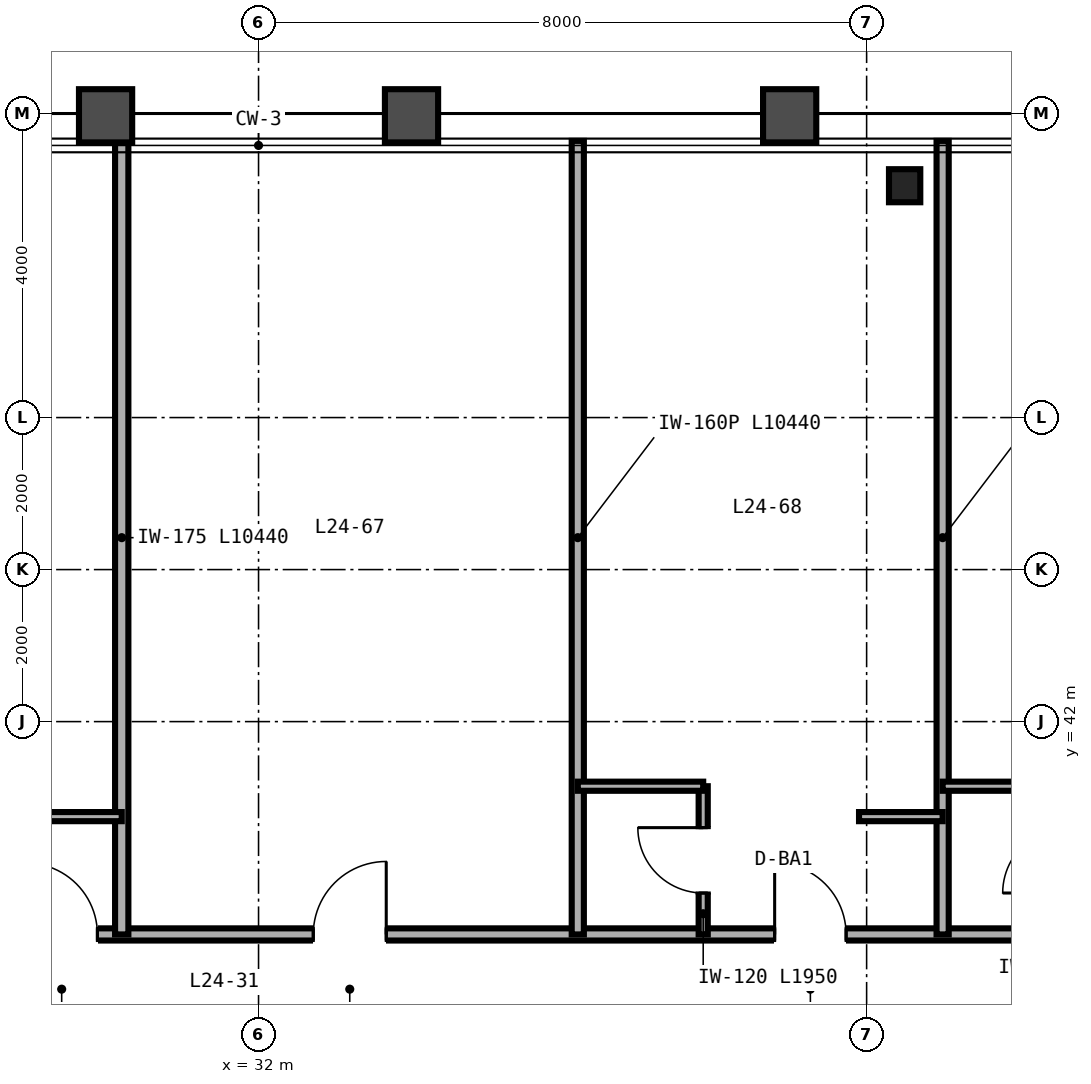
"""IFC4 building model, lengths in metres.
Left out: names, types, materials, properties, quantities, classifications, styles, units other than length and angle.
Written with IfcOpenShell. Run it as: python <this file> out.ifc"""

import sys

from ifc_helpers import new_model, si_unit, direction, frame, frame_2d, origin, origin_2d, place, context, subcontext, project, spatial, rectangle, i_section, extrude, source, transform, mapped, element, fill, save


model = new_model("IFC4")
c1 = context("Model", 3, precision=1e-05, world=origin(), true_north=direction((0.0, 1.0)))
c2 = subcontext(c1, "Body", "Model", "MODEL_VIEW")
j1 = project(units=[si_unit("LENGTHUNIT", "METRE"), si_unit("PLANEANGLEUNIT", "RADIAN")], contexts=[c1])
p1 = place(None, origin())
s1 = spatial("IfcSite", under=j1, at=p1, CompositionType="ELEMENT")
p2 = place(p1, origin())
s2 = spatial("IfcBuilding", under=s1, at=p2, CompositionType="ELEMENT")
p3 = place(p2, frame((0.0, 0.0, 100.8)))
s3 = spatial("IfcBuildingStorey", under=s2, at=p3, CompositionType="ELEMENT", Elevation=100.8)
m1 = source(origin(), c2, "Body", "SweptSolid", [
    extrude(i_section(OverallWidth=0.412, OverallDepth=0.435, WebThickness=0.036, FlangeThickness=0.057, FilletRadius=0.025, at=origin_2d()), origin(), (0.0, 0.0, 1.0), 3.36),
])
p4 = place(p3, frame((40.5, 49.05, 0.0), z_axis=(0.0, 0.0, 1.0), x_axis=(1.0, 0.0, 0.0)))
e1 = element("IfcColumn", 1, at=p4, inside=s3, PredefinedType="COLUMN", context=c2, shape_type="MappedRepresentation", body=[
    mapped(m1, transform((0.0, 0.0, 0.0), scale=1.0)),
])
p5 = place(p3, frame((14.0, 39.2, 0.0), z_axis=(0.0, 0.0, 1.0), x_axis=(1.0, 0.0, 0.0)))
e2 = element("IfcWall", 2, at=p5, inside=s3, PredefinedType="PARTITIONING", context=c2, shape_type="SweptSolid", body=[
    extrude(rectangle(XDim=36.0, YDim=0.16, at=frame_2d((18.0, 0.0))), origin(), (0.0, 0.0, 1.0), 2.581),
])
p6 = place(p5, frame((3.94, 0.0, 0.0)))
e3 = element("IfcOpeningElement", 3, at=p6, cuts=e2, PredefinedType="OPENING", context=c2, shape_type="SweptSolid", body=[
    extrude(rectangle(XDim=0.94, YDim=2.15, at=frame_2d((0.47, 1.075))), frame((0.0, 0.09, 0.0), z_axis=(0.0, -1.0, 0.0), x_axis=(1.0, 0.0, 0.0)), (0.0, 0.0, 1.0), 0.18),
])
p7 = place(p5, frame((7.89, 0.0, 0.0)))
e4 = element("IfcOpeningElement", 4, at=p7, cuts=e2, PredefinedType="OPENING", context=c2, shape_type="SweptSolid", body=[
    extrude(rectangle(XDim=0.94, YDim=2.15, at=frame_2d((0.47, 1.075))), frame((0.0, 0.09, 0.0), z_axis=(0.0, -1.0, 0.0), x_axis=(1.0, 0.0, 0.0)), (0.0, 0.0, 1.0), 0.18),
])
p8 = place(p5, frame((14.94, 0.0, 0.0)))
e5 = element("IfcOpeningElement", 5, at=p8, cuts=e2, PredefinedType="OPENING", context=c2, shape_type="SweptSolid", body=[
    extrude(rectangle(XDim=0.94, YDim=2.15, at=frame_2d((0.47, 1.075))), frame((0.0, 0.09, 0.0), z_axis=(0.0, -1.0, 0.0), x_axis=(1.0, 0.0, 0.0)), (0.0, 0.0, 1.0), 0.18),
])
p9 = place(p5, frame((18.72, 0.0, 0.0)))
e6 = element("IfcOpeningElement", 6, at=p9, cuts=e2, PredefinedType="OPENING", context=c2, shape_type="SweptSolid", body=[
    extrude(rectangle(XDim=0.96, YDim=2.15, at=frame_2d((0.48, 1.075))), frame((0.0, 0.09, 0.0), z_axis=(0.0, -1.0, 0.0), x_axis=(1.0, 0.0, 0.0)), (0.0, 0.0, 1.0), 0.18),
])
p10 = place(p5, frame((24.79, 0.0, 0.0)))
e7 = element("IfcOpeningElement", 7, at=p10, cuts=e2, PredefinedType="OPENING", context=c2, shape_type="SweptSolid", body=[
    extrude(rectangle(XDim=0.94, YDim=2.15, at=frame_2d((0.47, 1.075))), frame((0.0, 0.09, 0.0), z_axis=(0.0, -1.0, 0.0), x_axis=(1.0, 0.0, 0.0)), (0.0, 0.0, 1.0), 0.18),
])
p11 = place(p5, frame((30.34, 0.0, 0.0)))
e8 = element("IfcOpeningElement", 8, at=p11, cuts=e2, PredefinedType="OPENING", context=c2, shape_type="SweptSolid", body=[
    extrude(rectangle(XDim=0.94, YDim=2.15, at=frame_2d((0.47, 1.075))), frame((0.0, 0.09, 0.0), z_axis=(0.0, -1.0, 0.0), x_axis=(1.0, 0.0, 0.0)), (0.0, 0.0, 1.0), 0.18),
])
p12 = place(p5, frame((34.74, 0.0, 0.0)))
e9 = element("IfcOpeningElement", 9, at=p12, cuts=e2, PredefinedType="OPENING", context=c2, shape_type="SweptSolid", body=[
    extrude(rectangle(XDim=0.94, YDim=2.15, at=frame_2d((0.47, 1.075))), frame((0.0, 0.09, 0.0), z_axis=(0.0, -1.0, 0.0), x_axis=(1.0, 0.0, 0.0)), (0.0, 0.0, 1.0), 0.18),
])
p13 = place(p3, frame((30.2, 39.2, 0.0), z_axis=(0.0, 0.0, 1.0), x_axis=(0.0, 1.0, 0.0)))
e10 = element("IfcWall", 10, at=p13, inside=s3, PredefinedType="PARTITIONING", context=c2, shape_type="SweptSolid", body=[
    extrude(rectangle(XDim=10.44, YDim=0.175, at=frame_2d((5.22, 0.0))), origin(), (0.0, 0.0, 1.0), 2.433),
])
p14 = place(p3, frame((29.1, 40.75, 0.0), z_axis=(0.0, 0.0, 1.0), x_axis=(1.0, 0.0, 0.0)))
e11 = element("IfcWall", 11, at=p14, inside=s3, PredefinedType="PARTITIONING", context=c2, shape_type="SweptSolid", body=[
    extrude(rectangle(XDim=1.1, YDim=0.12, at=frame_2d((0.55, 0.0))), origin(), (0.0, 0.0, 1.0), 3.36),
])
p15 = place(p3, frame((36.2, 39.2, 0.0), z_axis=(0.0, 0.0, 1.0), x_axis=(0.0, 1.0, 0.0)))
e12 = element("IfcWall", 12, at=p15, inside=s3, PredefinedType="PARTITIONING", context=c2, shape_type="SweptSolid", body=[
    extrude(rectangle(XDim=10.44, YDim=0.16, at=frame_2d((5.22, 0.0))), origin(), (0.0, 0.0, 1.0), 2.433),
])
p16 = place(p3, frame((41.0, 39.2, 0.0), z_axis=(0.0, 0.0, 1.0), x_axis=(0.0, 1.0, 0.0)))
e13 = element("IfcWall", 13, at=p16, inside=s3, PredefinedType="PARTITIONING", context=c2, shape_type="SweptSolid", body=[
    extrude(rectangle(XDim=10.44, YDim=0.16, at=frame_2d((5.22, 0.0))), origin(), (0.0, 0.0, 1.0), 2.823),
])
p17 = place(p3, frame((37.85, 39.2, 0.0), z_axis=(0.0, 0.0, 1.0), x_axis=(0.0, 1.0, 0.0)))
e14 = element("IfcWall", 14, at=p17, inside=s3, PredefinedType="PARTITIONING", context=c2, shape_type="SweptSolid", body=[
    extrude(rectangle(XDim=1.95, YDim=0.12, at=frame_2d((0.975, 0.0))), origin(), (0.0, 0.0, 1.0), 3.36),
])
p18 = place(p17, frame((0.545, 0.0, 0.0)))
e15 = element("IfcOpeningElement", 15, at=p18, cuts=e14, PredefinedType="OPENING", context=c2, shape_type="SweptSolid", body=[
    extrude(rectangle(XDim=0.86, YDim=2.1, at=frame_2d((0.43, 1.05))), frame((0.0, 0.07, 0.0), z_axis=(0.0, -1.0, 0.0), x_axis=(1.0, 0.0, 0.0)), (0.0, 0.0, 1.0), 0.14),
])
p19 = place(p3, frame((36.2, 41.15, 0.0), z_axis=(0.0, 0.0, 1.0), x_axis=(1.0, 0.0, 0.0)))
e16 = element("IfcWall", 16, at=p19, inside=s3, PredefinedType="PARTITIONING", context=c2, shape_type="SweptSolid", body=[
    extrude(rectangle(XDim=1.65, YDim=0.12, at=frame_2d((0.825, 0.0))), origin(), (0.0, 0.0, 1.0), 3.36),
])
p20 = place(p3, frame((39.9, 40.75, 0.0), z_axis=(0.0, 0.0, 1.0), x_axis=(1.0, 0.0, 0.0)))
e17 = element("IfcWall", 17, at=p20, inside=s3, PredefinedType="PARTITIONING", context=c2, shape_type="SweptSolid", body=[
    extrude(rectangle(XDim=1.1, YDim=0.12, at=frame_2d((0.55, 0.0))), origin(), (0.0, 0.0, 1.0), 2.581),
])
p21 = place(p3, frame((41.0, 41.15, 0.0), z_axis=(0.0, 0.0, 1.0), x_axis=(1.0, 0.0, 0.0)))
e18 = element("IfcWall", 18, at=p21, inside=s3, PredefinedType="PARTITIONING", context=c2, shape_type="SweptSolid", body=[
    extrude(rectangle(XDim=1.65, YDim=0.12, at=frame_2d((0.825, 0.0))), origin(), (0.0, 0.0, 1.0), 3.36),
])
m2 = source(origin(), c2, "Body", "SweptSolid", [
    extrude(rectangle(XDim=0.86, YDim=2.1, at=frame_2d((0.43, 1.05))), frame((0.0, 0.025, 0.0), z_axis=(0.0, -1.0, 0.0), x_axis=(1.0, 0.0, 0.0)), (0.0, 0.0, 1.0), 0.05),
])
p22 = place(p18, origin())
e19 = element("IfcDoor", 19, at=p22, inside=s3, OperationType="SINGLE_SWING_RIGHT", PredefinedType="DOOR", context=c2, shape_type="MappedRepresentation", body=[
    mapped(m2, transform((0.0, 0.0, 0.0), scale=1.0)),
])
fill(e15, e19)
m3 = source(origin(), c2, "Body", "SweptSolid", [
    extrude(rectangle(XDim=0.94, YDim=2.15, at=frame_2d((0.47, 1.075))), frame((0.0, 0.025, 0.0), z_axis=(0.0, -1.0, 0.0), x_axis=(1.0, 0.0, 0.0)), (0.0, 0.0, 1.0), 0.05),
])
p23 = place(p8, origin())
e20 = element("IfcDoor", 20, at=p23, inside=s3, OperationType="SINGLE_SWING_LEFT", PredefinedType="DOOR", context=c2, shape_type="MappedRepresentation", body=[
    mapped(m3, transform((0.0, 0.0, 0.0), scale=1.0)),
])
fill(e5, e20)
m4 = source(origin(), c2, "Body", "SweptSolid", [
    extrude(rectangle(XDim=0.96, YDim=2.15, at=frame_2d((0.48, 1.075))), frame((0.0, 0.025, 0.0), z_axis=(0.0, -1.0, 0.0), x_axis=(1.0, 0.0, 0.0)), (0.0, 0.0, 1.0), 0.05),
])
p24 = place(p9, origin())
e21 = element("IfcDoor", 21, at=p24, inside=s3, OperationType="SINGLE_SWING_RIGHT", PredefinedType="DOOR", context=c2, shape_type="MappedRepresentation", body=[
    mapped(m4, transform((0.0, 0.0, 0.0), scale=1.0)),
])
fill(e6, e21)
p25 = place(p10, origin())
e22 = element("IfcDoor", 22, at=p25, inside=s3, OperationType="SINGLE_SWING_LEFT", PredefinedType="DOOR", context=c2, shape_type="MappedRepresentation", body=[
    mapped(m3, transform((0.0, 0.0, 0.0), scale=1.0)),
])
fill(e7, e22)
save(model, sys.argv[1])
